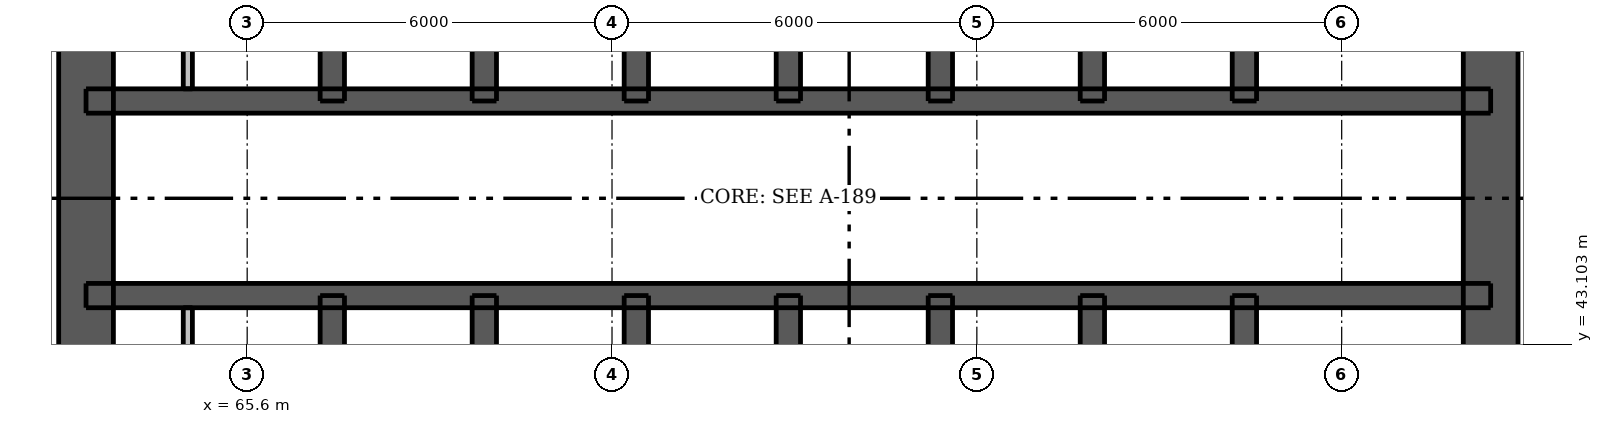
"""IFC4 building model, lengths in metres.
Left out: names, types, materials, properties, quantities, classifications, styles, units other than length and angle.
Written with IfcOpenShell. Run it as: python <this file> out.ifc"""

import sys

from ifc_helpers import new_model, si_unit, direction, frame, frame_2d, origin, place, context, subcontext, project, spatial, rectangle, extrude, element, fill, save


model = new_model("IFC4")
c1 = context("Model", 3, precision=1e-05, world=origin(), true_north=direction((0.0, 1.0)))
c2 = subcontext(c1, "Body", "Model", "MODEL_VIEW")
j1 = project(units=[si_unit("LENGTHUNIT", "METRE"), si_unit("PLANEANGLEUNIT", "RADIAN")], contexts=[c1])
p1 = place(None, origin())
s1 = spatial("IfcSite", under=j1, at=p1, CompositionType="ELEMENT")
p2 = place(p1, origin())
s2 = spatial("IfcBuilding", under=s1, at=p2, CompositionType="ELEMENT")
p3 = place(p2, frame((0.0, 0.0, 66.4)))
s3 = spatial("IfcBuildingStorey", under=s2, at=p3, CompositionType="ELEMENT", Elevation=66.4)
p4 = place(p3, frame((62.95, 33.5, 0.0), z_axis=(0.0, 0.0, 1.0), x_axis=(0.0, 1.0, 0.0)))
e1 = element("IfcWall", 1, at=p4, inside=s3, PredefinedType="SHEAR", context=c2, shape_type="SweptSolid", body=[
    extrude(rectangle(XDim=24.0, YDim=0.9, at=frame_2d((12.0, 0.0))), origin(), (0.0, 0.0, 1.0), 2.95),
])
p5 = place(p4, frame((11.2, 0.0, 0.0)))
e2 = element("IfcOpeningElement", 2, at=p5, cuts=e1, PredefinedType="OPENING", context=c2, shape_type="SweptSolid", body=[
    extrude(rectangle(XDim=1.6, YDim=2.1, at=frame_2d((0.8, 1.05))), frame((0.0, 0.46, 0.0), z_axis=(0.0, -1.0, 0.0), x_axis=(1.0, 0.0, 0.0)), (0.0, 0.0, 1.0), 0.92),
])
p6 = place(p3, frame((86.05, 33.5, 0.0), z_axis=(0.0, 0.0, 1.0), x_axis=(0.0, 1.0, 0.0)))
e3 = element("IfcWall", 3, at=p6, inside=s3, PredefinedType="SHEAR", context=c2, shape_type="SweptSolid", body=[
    extrude(rectangle(XDim=24.0, YDim=0.9, at=frame_2d((12.0, 0.0))), origin(), (0.0, 0.0, 1.0), 2.95),
])
p7 = place(p6, frame((11.2, 0.0, 0.0)))
e4 = element("IfcOpeningElement", 4, at=p7, cuts=e3, PredefinedType="OPENING", context=c2, shape_type="SweptSolid", body=[
    extrude(rectangle(XDim=1.6, YDim=2.1, at=frame_2d((0.8, 1.05))), frame((0.0, 0.46, 0.0), z_axis=(0.0, -1.0, 0.0), x_axis=(1.0, 0.0, 0.0)), (0.0, 0.0, 1.0), 0.92),
])
p8 = place(p3, frame((62.95, 43.9, 0.0), z_axis=(0.0, 0.0, 1.0), x_axis=(1.0, 0.0, 0.0)))
e5 = element("IfcWall", 5, at=p8, inside=s3, PredefinedType="SHEAR", context=c2, shape_type="SweptSolid", body=[
    extrude(rectangle(XDim=23.1, YDim=0.4, at=frame_2d((11.55, 0.0))), origin(), (0.0, 0.0, 1.0), 2.95),
])
p9 = place(p8, frame((0.662, 0.0, 0.0)))
e6 = element("IfcOpeningElement", 6, at=p9, cuts=e5, PredefinedType="OPENING", context=c2, shape_type="SweptSolid", body=[
    extrude(rectangle(XDim=0.8, YDim=2.1, at=frame_2d((0.4, 1.05))), frame((0.0, 0.21, 0.0), z_axis=(0.0, -1.0, 0.0), x_axis=(1.0, 0.0, 0.0)), (0.0, 0.0, 1.0), 0.42),
])
p10 = place(p8, frame((2.312, 0.0, 0.0)))
e7 = element("IfcOpeningElement", 7, at=p10, cuts=e5, PredefinedType="OPENING", context=c2, shape_type="SweptSolid", body=[
    extrude(rectangle(XDim=0.9, YDim=2.1, at=frame_2d((0.45, 1.05))), frame((0.0, 0.21, 0.0), z_axis=(0.0, -1.0, 0.0), x_axis=(1.0, 0.0, 0.0)), (0.0, 0.0, 1.0), 0.42),
])
p11 = place(p8, frame((20.5, 0.0, 0.0)))
e8 = element("IfcOpeningElement", 8, at=p11, cuts=e5, PredefinedType="OPENING", context=c2, shape_type="SweptSolid", body=[
    extrude(rectangle(XDim=0.9, YDim=2.1, at=frame_2d((0.45, 1.05))), frame((0.0, 0.21, 0.0), z_axis=(0.0, -1.0, 0.0), x_axis=(1.0, 0.0, 0.0)), (0.0, 0.0, 1.0), 0.42),
])
p12 = place(p8, frame((4.75, 0.0, 0.0)))
e9 = element("IfcOpeningElement", 9, at=p12, cuts=e5, PredefinedType="OPENING", context=c2, shape_type="SweptSolid", body=[
    extrude(rectangle(XDim=1.1, YDim=2.1, at=frame_2d((0.55, 1.05))), frame((0.0, 0.21, 0.0), z_axis=(0.0, -1.0, 0.0), x_axis=(1.0, 0.0, 0.0)), (0.0, 0.0, 1.0), 0.42),
])
p13 = place(p8, frame((7.25, 0.0, 0.0)))
e10 = element("IfcOpeningElement", 10, at=p13, cuts=e5, PredefinedType="OPENING", context=c2, shape_type="SweptSolid", body=[
    extrude(rectangle(XDim=1.1, YDim=2.1, at=frame_2d((0.55, 1.05))), frame((0.0, 0.21, 0.0), z_axis=(0.0, -1.0, 0.0), x_axis=(1.0, 0.0, 0.0)), (0.0, 0.0, 1.0), 0.42),
])
p14 = place(p8, frame((9.75, 0.0, 0.0)))
e11 = element("IfcOpeningElement", 11, at=p14, cuts=e5, PredefinedType="OPENING", context=c2, shape_type="SweptSolid", body=[
    extrude(rectangle(XDim=1.1, YDim=2.1, at=frame_2d((0.55, 1.05))), frame((0.0, 0.21, 0.0), z_axis=(0.0, -1.0, 0.0), x_axis=(1.0, 0.0, 0.0)), (0.0, 0.0, 1.0), 0.42),
])
p15 = place(p8, frame((12.25, 0.0, 0.0)))
e12 = element("IfcOpeningElement", 12, at=p15, cuts=e5, PredefinedType="OPENING", context=c2, shape_type="SweptSolid", body=[
    extrude(rectangle(XDim=1.1, YDim=2.1, at=frame_2d((0.55, 1.05))), frame((0.0, 0.21, 0.0), z_axis=(0.0, -1.0, 0.0), x_axis=(1.0, 0.0, 0.0)), (0.0, 0.0, 1.0), 0.42),
])
p16 = place(p8, frame((14.75, 0.0, 0.0)))
e13 = element("IfcOpeningElement", 13, at=p16, cuts=e5, PredefinedType="OPENING", context=c2, shape_type="SweptSolid", body=[
    extrude(rectangle(XDim=1.1, YDim=2.1, at=frame_2d((0.55, 1.05))), frame((0.0, 0.21, 0.0), z_axis=(0.0, -1.0, 0.0), x_axis=(1.0, 0.0, 0.0)), (0.0, 0.0, 1.0), 0.42),
])
p17 = place(p8, frame((17.25, 0.0, 0.0)))
e14 = element("IfcOpeningElement", 14, at=p17, cuts=e5, PredefinedType="OPENING", context=c2, shape_type="SweptSolid", body=[
    extrude(rectangle(XDim=1.1, YDim=2.1, at=frame_2d((0.55, 1.05))), frame((0.0, 0.21, 0.0), z_axis=(0.0, -1.0, 0.0), x_axis=(1.0, 0.0, 0.0)), (0.0, 0.0, 1.0), 0.42),
])
p18 = place(p3, frame((62.95, 47.1, 0.0), z_axis=(0.0, 0.0, 1.0), x_axis=(1.0, 0.0, 0.0)))
e15 = element("IfcWall", 15, at=p18, inside=s3, PredefinedType="SHEAR", context=c2, shape_type="SweptSolid", body=[
    extrude(rectangle(XDim=23.1, YDim=0.4, at=frame_2d((11.55, 0.0))), origin(), (0.0, 0.0, 1.0), 2.95),
])
p19 = place(p18, frame((0.662, 0.0, 0.0)))
e16 = element("IfcOpeningElement", 16, at=p19, cuts=e15, PredefinedType="OPENING", context=c2, shape_type="SweptSolid", body=[
    extrude(rectangle(XDim=0.8, YDim=2.1, at=frame_2d((0.4, 1.05))), frame((0.0, 0.21, 0.0), z_axis=(0.0, -1.0, 0.0), x_axis=(1.0, 0.0, 0.0)), (0.0, 0.0, 1.0), 0.42),
])
p20 = place(p18, frame((2.312, 0.0, 0.0)))
e17 = element("IfcOpeningElement", 17, at=p20, cuts=e15, PredefinedType="OPENING", context=c2, shape_type="SweptSolid", body=[
    extrude(rectangle(XDim=0.9, YDim=2.1, at=frame_2d((0.45, 1.05))), frame((0.0, 0.21, 0.0), z_axis=(0.0, -1.0, 0.0), x_axis=(1.0, 0.0, 0.0)), (0.0, 0.0, 1.0), 0.42),
])
p21 = place(p18, frame((20.5, 0.0, 0.0)))
e18 = element("IfcOpeningElement", 18, at=p21, cuts=e15, PredefinedType="OPENING", context=c2, shape_type="SweptSolid", body=[
    extrude(rectangle(XDim=0.9, YDim=2.1, at=frame_2d((0.45, 1.05))), frame((0.0, 0.21, 0.0), z_axis=(0.0, -1.0, 0.0), x_axis=(1.0, 0.0, 0.0)), (0.0, 0.0, 1.0), 0.42),
])
p22 = place(p3, frame((67.0, 33.95, 0.0), z_axis=(0.0, 0.0, 1.0), x_axis=(0.0, 1.0, 0.0)))
e19 = element("IfcWall", 19, at=p22, inside=s3, PredefinedType="SHEAR", context=c2, shape_type="SweptSolid", body=[
    extrude(rectangle(XDim=9.95, YDim=0.4, at=frame_2d((4.975, 0.0))), origin(), (0.0, 0.0, 1.0), 2.95),
])
p23 = place(p22, frame((0.65, 0.0, 0.0)))
e20 = element("IfcOpeningElement", 20, at=p23, cuts=e19, PredefinedType="OPENING", context=c2, shape_type="SweptSolid", body=[
    extrude(rectangle(XDim=1.1, YDim=2.1, at=frame_2d((0.55, 1.05))), frame((0.0, 0.21, 0.0), z_axis=(0.0, -1.0, 0.0), x_axis=(1.0, 0.0, 0.0)), (0.0, 0.0, 1.0), 0.42),
])
for number, where, z_axis, x_axis in (
    (21, (67.0, 47.1, 0.0), (0.0, 0.0, 1.0), (0.0, 1.0, 0.0)),
    (22, (82.0, 33.95, 0.0), (0.0, 0.0, 1.0), (0.0, 1.0, 0.0)),
    (23, (82.0, 47.1, 0.0), (0.0, 0.0, 1.0), (0.0, 1.0, 0.0)),
):
    element("IfcWall", number, at=place(p3, frame(where, z_axis=z_axis, x_axis=x_axis)), inside=s3, PredefinedType="SHEAR", context=c2, shape_type="SweptSolid", body=[
        extrude(rectangle(XDim=9.95, YDim=0.4, at=frame_2d((4.975, 0.0))), origin(), (0.0, 0.0, 1.0), 2.95),
    ])
for number, where, z_axis, x_axis in (
    (24, (69.5, 41.0, 0.0), (0.0, 0.0, 1.0), (0.0, 1.0, 0.0)),
    (25, (69.5, 47.1, 0.0), (0.0, 0.0, 1.0), (0.0, 1.0, 0.0)),
    (26, (72.0, 41.0, 0.0), (0.0, 0.0, 1.0), (0.0, 1.0, 0.0)),
    (27, (72.0, 47.1, 0.0), (0.0, 0.0, 1.0), (0.0, 1.0, 0.0)),
    (28, (74.5, 41.0, 0.0), (0.0, 0.0, 1.0), (0.0, 1.0, 0.0)),
    (29, (74.5, 47.1, 0.0), (0.0, 0.0, 1.0), (0.0, 1.0, 0.0)),
    (30, (77.0, 41.0, 0.0), (0.0, 0.0, 1.0), (0.0, 1.0, 0.0)),
    (31, (77.0, 47.1, 0.0), (0.0, 0.0, 1.0), (0.0, 1.0, 0.0)),
    (32, (79.5, 41.0, 0.0), (0.0, 0.0, 1.0), (0.0, 1.0, 0.0)),
    (33, (79.5, 47.1, 0.0), (0.0, 0.0, 1.0), (0.0, 1.0, 0.0)),
):
    element("IfcWall", number, at=place(p3, frame(where, z_axis=z_axis, x_axis=x_axis)), inside=s3, PredefinedType="SHEAR", context=c2, shape_type="SweptSolid", body=[
        extrude(rectangle(XDim=2.9, YDim=0.4, at=frame_2d((1.45, 0.0))), origin(), (0.0, 0.0, 1.0), 2.95),
    ])
for number, where, z_axis, x_axis in (
    (34, (64.624, 41.2, 0.0), (0.0, 0.0, 1.0), (0.0, 1.0, 0.0)),
    (35, (64.624, 47.3, 0.0), (0.0, 0.0, 1.0), (0.0, 1.0, 0.0)),
):
    element("IfcWall", number, at=place(p3, frame(where, z_axis=z_axis, x_axis=x_axis)), inside=s3, PredefinedType="PLUMBINGWALL", context=c2, shape_type="SweptSolid", body=[
        extrude(rectangle(XDim=2.5, YDim=0.15, at=frame_2d((1.25, 0.0))), origin(), (0.0, 0.0, 1.0), 2.95),
    ])
p24 = place(p5, origin())
e36 = element("IfcDoor", 36, at=p24, inside=s3, OperationType="DOUBLE_DOOR_SINGLE_SWING", PredefinedType="DOOR", context=c2, shape_type="SweptSolid", body=[
    extrude(rectangle(XDim=1.6, YDim=2.1, at=frame_2d((0.8, 1.05))), frame((0.0, -0.388, 0.0), z_axis=(0.0, -1.0, 0.0), x_axis=(1.0, 0.0, 0.0)), (0.0, 0.0, 1.0), 0.05),
])
fill(e2, e36)
p25 = place(p7, origin())
e37 = element("IfcDoor", 37, at=p25, inside=s3, OperationType="DOUBLE_DOOR_SINGLE_SWING", PredefinedType="DOOR", context=c2, shape_type="SweptSolid", body=[
    extrude(rectangle(XDim=1.6, YDim=2.1, at=frame_2d((0.8, 1.05))), frame((0.0, 0.438, 0.0), z_axis=(0.0, -1.0, 0.0), x_axis=(1.0, 0.0, 0.0)), (0.0, 0.0, 1.0), 0.05),
])
fill(e4, e37)
p26 = place(p9, origin())
e38 = element("IfcDoor", 38, at=p26, inside=s3, OperationType="SINGLE_SWING_LEFT", PredefinedType="DOOR", context=c2, shape_type="SweptSolid", body=[
    extrude(rectangle(XDim=0.8, YDim=2.1, at=frame_2d((0.4, 1.05))), frame((0.0, -0.138, 0.0), z_axis=(0.0, -1.0, 0.0), x_axis=(1.0, 0.0, 0.0)), (0.0, 0.0, 1.0), 0.05),
])
fill(e6, e38)
p27 = place(p10, origin())
e39 = element("IfcDoor", 39, at=p27, inside=s3, OperationType="SINGLE_SWING_RIGHT", PredefinedType="DOOR", context=c2, shape_type="SweptSolid", body=[
    extrude(rectangle(XDim=0.9, YDim=2.1, at=frame_2d((0.45, 1.05))), frame((0.0, -0.138, 0.0), z_axis=(0.0, -1.0, 0.0), x_axis=(1.0, 0.0, 0.0)), (0.0, 0.0, 1.0), 0.05),
])
fill(e7, e39)
p28 = place(p11, origin())
e40 = element("IfcDoor", 40, at=p28, inside=s3, OperationType="SINGLE_SWING_LEFT", PredefinedType="DOOR", context=c2, shape_type="SweptSolid", body=[
    extrude(rectangle(XDim=0.9, YDim=2.1, at=frame_2d((0.45, 1.05))), frame((0.0, -0.138, 0.0), z_axis=(0.0, -1.0, 0.0), x_axis=(1.0, 0.0, 0.0)), (0.0, 0.0, 1.0), 0.05),
])
fill(e8, e40)
p29 = place(p19, origin())
e41 = element("IfcDoor", 41, at=p29, inside=s3, OperationType="SINGLE_SWING_LEFT", PredefinedType="DOOR", context=c2, shape_type="SweptSolid", body=[
    extrude(rectangle(XDim=0.8, YDim=2.1, at=frame_2d((0.4, 1.05))), frame((0.0, 0.188, 0.0), z_axis=(0.0, -1.0, 0.0), x_axis=(1.0, 0.0, 0.0)), (0.0, 0.0, 1.0), 0.05),
])
fill(e16, e41)
p30 = place(p20, origin())
e42 = element("IfcDoor", 42, at=p30, inside=s3, OperationType="SINGLE_SWING_RIGHT", PredefinedType="DOOR", context=c2, shape_type="SweptSolid", body=[
    extrude(rectangle(XDim=0.9, YDim=2.1, at=frame_2d((0.45, 1.05))), frame((0.0, 0.188, 0.0), z_axis=(0.0, -1.0, 0.0), x_axis=(1.0, 0.0, 0.0)), (0.0, 0.0, 1.0), 0.05),
])
fill(e17, e42)
p31 = place(p21, origin())
e43 = element("IfcDoor", 43, at=p31, inside=s3, OperationType="SINGLE_SWING_LEFT", PredefinedType="DOOR", context=c2, shape_type="SweptSolid", body=[
    extrude(rectangle(XDim=0.9, YDim=2.1, at=frame_2d((0.45, 1.05))), frame((0.0, 0.188, 0.0), z_axis=(0.0, -1.0, 0.0), x_axis=(1.0, 0.0, 0.0)), (0.0, 0.0, 1.0), 0.05),
])
fill(e18, e43)
p32 = place(p12, origin())
e44 = element("IfcDoor", 44, at=p32, inside=s3, OperationType="DOUBLE_DOOR_SLIDING", PredefinedType="DOOR", context=c2, shape_type="SweptSolid", body=[
    extrude(rectangle(XDim=1.1, YDim=2.1, at=frame_2d((0.55, 1.05))), frame((0.0, 0.025, 0.0), z_axis=(0.0, -1.0, 0.0), x_axis=(1.0, 0.0, 0.0)), (0.0, 0.0, 1.0), 0.05),
])
fill(e9, e44)
p33 = place(p13, origin())
e45 = element("IfcDoor", 45, at=p33, inside=s3, OperationType="DOUBLE_DOOR_SLIDING", PredefinedType="DOOR", context=c2, shape_type="SweptSolid", body=[
    extrude(rectangle(XDim=1.1, YDim=2.1, at=frame_2d((0.55, 1.05))), frame((0.0, 0.025, 0.0), z_axis=(0.0, -1.0, 0.0), x_axis=(1.0, 0.0, 0.0)), (0.0, 0.0, 1.0), 0.05),
])
fill(e10, e45)
p34 = place(p14, origin())
e46 = element("IfcDoor", 46, at=p34, inside=s3, OperationType="DOUBLE_DOOR_SLIDING", PredefinedType="DOOR", context=c2, shape_type="SweptSolid", body=[
    extrude(rectangle(XDim=1.1, YDim=2.1, at=frame_2d((0.55, 1.05))), frame((0.0, 0.025, 0.0), z_axis=(0.0, -1.0, 0.0), x_axis=(1.0, 0.0, 0.0)), (0.0, 0.0, 1.0), 0.05),
])
fill(e11, e46)
p35 = place(p15, origin())
e47 = element("IfcDoor", 47, at=p35, inside=s3, OperationType="DOUBLE_DOOR_SLIDING", PredefinedType="DOOR", context=c2, shape_type="SweptSolid", body=[
    extrude(rectangle(XDim=1.1, YDim=2.1, at=frame_2d((0.55, 1.05))), frame((0.0, 0.025, 0.0), z_axis=(0.0, -1.0, 0.0), x_axis=(1.0, 0.0, 0.0)), (0.0, 0.0, 1.0), 0.05),
])
fill(e12, e47)
p36 = place(p16, origin())
e48 = element("IfcDoor", 48, at=p36, inside=s3, OperationType="DOUBLE_DOOR_SLIDING", PredefinedType="DOOR", context=c2, shape_type="SweptSolid", body=[
    extrude(rectangle(XDim=1.1, YDim=2.1, at=frame_2d((0.55, 1.05))), frame((0.0, 0.025, 0.0), z_axis=(0.0, -1.0, 0.0), x_axis=(1.0, 0.0, 0.0)), (0.0, 0.0, 1.0), 0.05),
])
fill(e13, e48)
p37 = place(p17, origin())
e49 = element("IfcDoor", 49, at=p37, inside=s3, OperationType="DOUBLE_DOOR_SLIDING", PredefinedType="DOOR", context=c2, shape_type="SweptSolid", body=[
    extrude(rectangle(XDim=1.1, YDim=2.1, at=frame_2d((0.55, 1.05))), frame((0.0, 0.025, 0.0), z_axis=(0.0, -1.0, 0.0), x_axis=(1.0, 0.0, 0.0)), (0.0, 0.0, 1.0), 0.05),
])
fill(e14, e49)
save(model, sys.argv[1])
